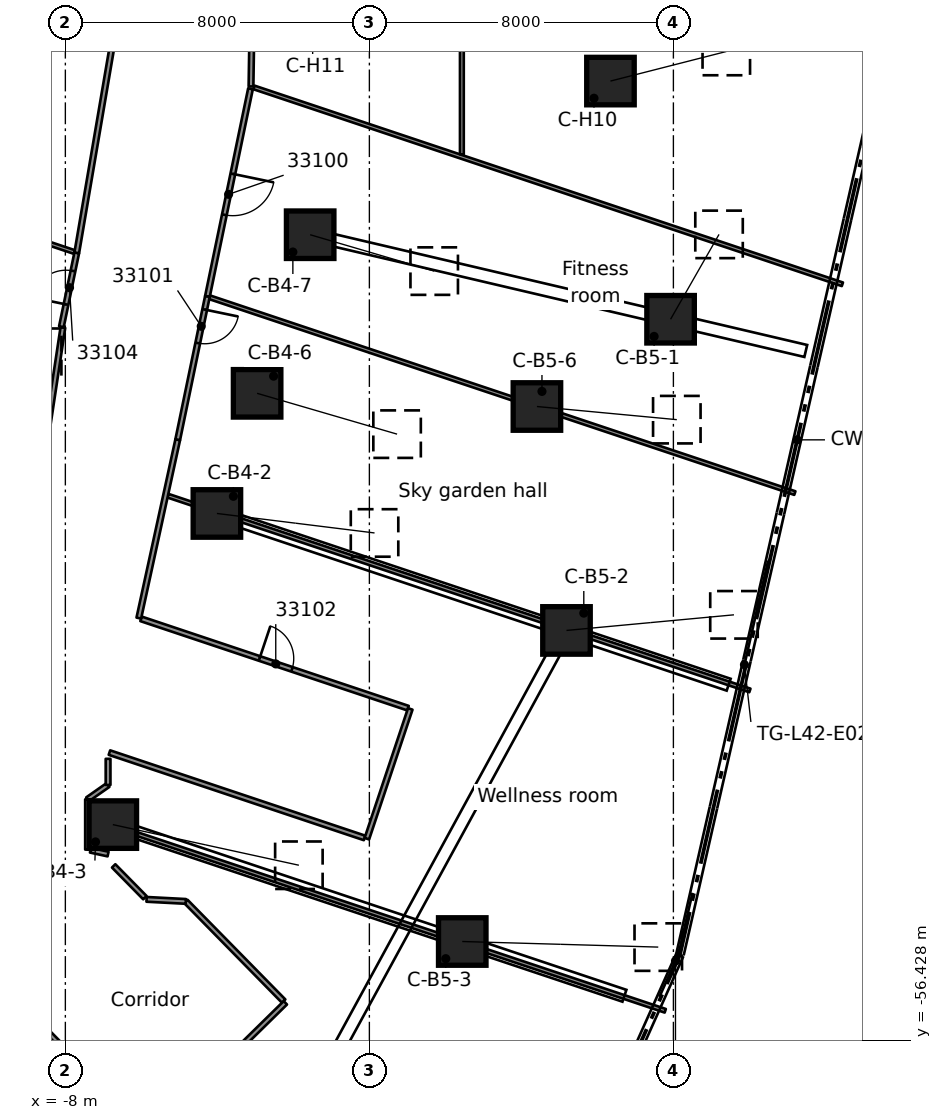
"""IFC4 building model, lengths in metres.
Left out: names, types, materials, properties, quantities, classifications, styles, units other than length and angle.
Written with IfcOpenShell. Run it as: python <this file> out.ifc"""

import sys

from ifc_helpers import new_model, si_unit, direction, frame, frame_2d, origin, origin_2d, place, context, subcontext, project, spatial, rectangle, extrude, element, fill, save


model = new_model("IFC4")
c1 = context("Model", 3, precision=1e-05, world=origin(), true_north=direction((0.0, 1.0)))
c2 = subcontext(c1, "Body", "Model", "MODEL_VIEW")
j1 = project(units=[si_unit("LENGTHUNIT", "METRE"), si_unit("PLANEANGLEUNIT", "RADIAN")], contexts=[c1])
p1 = place(None, origin())
s1 = spatial("IfcSite", under=j1, at=p1, CompositionType="ELEMENT")
p2 = place(p1, origin())
s2 = spatial("IfcBuilding", under=s1, at=p2, CompositionType="ELEMENT")
p3 = place(p2, frame((0.0, 0.0, 163.1)))
s3 = spatial("IfcBuildingStorey", under=s2, at=p3, CompositionType="ELEMENT", Elevation=163.1)
p4 = place(p3, frame((-12.153, -36.321, 0.498), z_axis=(0.688479389186, -0.401551615226, 0.603947374343), x_axis=(0.503813582117, 0.863812406992, 0.0)))
e1 = element("IfcColumn", 1, at=p4, inside=s3, PredefinedType="COLUMN", context=c2, shape_type="SweptSolid", body=[
    extrude(rectangle(XDim=1.25, YDim=1.25, at=origin_2d()), origin(), (0.0, 0.0, 1.0), 4.973),
])
p5 = place(p3, frame((-4.012, -42.56, 0.509), z_axis=(0.80785324827, -0.09989992199, 0.580855519769), x_axis=(0.122726170673, 0.992440571033, 0.0)))
e2 = element("IfcColumn", 2, at=p5, inside=s3, PredefinedType="COLUMN", context=c2, shape_type="SweptSolid", body=[
    extrude(rectangle(XDim=1.25, YDim=1.25, at=origin_2d()), origin(), (0.0, 0.0, 1.0), 5.135),
])
p6 = place(p3, frame((-6.751, -50.747, 0.54), z_axis=(0.844129947707, -0.184282482849, 0.50347253937), x_axis=(0.213287138961, 0.976989557955, 0.0)))
e3 = element("IfcColumn", 3, at=p6, inside=s3, PredefinedType="COLUMN", context=c2, shape_type="SweptSolid", body=[
    extrude(rectangle(XDim=1.25, YDim=1.25, at=origin_2d()), origin(), (0.0, 0.0, 1.0), 5.8),
])
p7 = place(p3, frame((-2.954, -39.399, 0.491), z_axis=(0.754598617916, -0.220037075448, 0.61819463866), x_axis=(0.279936464818, 0.960018528813, 0.0)))
e4 = element("IfcColumn", 4, at=p7, inside=s3, PredefinedType="COLUMN", context=c2, shape_type="SweptSolid", body=[
    extrude(rectangle(XDim=1.25, YDim=1.25, at=origin_2d()), origin(), (0.0, 0.0, 1.0), 4.881),
])
p8 = place(p3, frame((-1.558, -35.226, 0.464), z_axis=(0.712112227691, -0.208786831155, 0.670301599513), x_axis=(0.281350203926, 0.959605159819, 0.0)))
e5 = element("IfcColumn", 5, at=p8, inside=s3, PredefinedType="COLUMN", context=c2, shape_type="SweptSolid", body=[
    extrude(rectangle(XDim=1.25, YDim=1.25, at=origin_2d()), origin(), (0.0, 0.0, 1.0), 4.584),
])
p9 = place(p3, frame((7.926, -37.45, 0.39), z_axis=(0.3093960676, 0.541887482626, 0.781429478281), x_axis=(-0.868418381387, 0.495832143845, 0.0)))
e6 = element("IfcColumn", 6, at=p9, inside=s3, PredefinedType="COLUMN", context=c2, shape_type="SweptSolid", body=[
    extrude(rectangle(XDim=1.25, YDim=1.25, at=origin_2d()), origin(), (0.0, 0.0, 1.0), 4.121),
])
p10 = place(p3, frame((5.187, -45.638, 0.519), z_axis=(0.827554248097, 0.077157708689, 0.556058139448), x_axis=(-0.092833209063, 0.995681673676, 0.0)))
e7 = element("IfcColumn", 7, at=p10, inside=s3, PredefinedType="COLUMN", context=c2, shape_type="SweptSolid", body=[
    extrude(rectangle(XDim=1.25, YDim=1.25, at=origin_2d()), origin(), (0.0, 0.0, 1.0), 5.325),
])
p11 = place(p3, frame((2.444, -53.823, 0.544), z_axis=(0.87058335565, -0.024806701382, 0.491395205951), x_axis=(0.028482783098, 0.99959428323, 0.0)))
e8 = element("IfcColumn", 8, at=p11, inside=s3, PredefinedType="COLUMN", context=c2, shape_type="SweptSolid", body=[
    extrude(rectangle(XDim=1.25, YDim=1.25, at=origin_2d()), origin(), (0.0, 0.0, 1.0), 5.925),
])
p12 = place(p3, frame((4.409, -39.746, 0.483), z_axis=(0.769712005055, -0.072335980313, 0.634279855605), x_axis=(0.093565709776, 0.99561310656, 0.0)))
e9 = element("IfcColumn", 9, at=p12, inside=s3, PredefinedType="COLUMN", context=c2, shape_type="SweptSolid", body=[
    extrude(rectangle(XDim=1.25, YDim=1.25, at=origin_2d()), origin(), (0.0, 0.0, 1.0), 4.782),
])
p13 = place(p3, frame((6.344, -31.183, 0.444), z_axis=(0.68893180134, 0.175861085372, 0.703168437683), x_axis=(-0.247335189642, 0.968929978876, 0.0)))
e10 = element("IfcColumn", 10, at=p13, inside=s3, PredefinedType="COLUMN", context=c2, shape_type="SweptSolid", body=[
    extrude(rectangle(XDim=1.25, YDim=1.25, at=origin_2d()), origin(), (0.0, 0.0, 1.0), 4.424),
])
p14 = place(p3, frame((-10.932, -53.69, 0.0), z_axis=(0.0, 0.0, 1.0), x_axis=(0.700343889426, -0.713805601368, 0.0)))
e11 = element("IfcWall", 11, at=p14, inside=s3, PredefinedType="PARTITIONING", context=c2, shape_type="SweptSolid", body=[
    extrude(rectangle(XDim=7.291, YDim=0.125, at=frame_2d((3.645, 0.0))), origin(), (0.0, 0.0, 1.0), 3.56),
])
p15 = place(p3, frame((-6.729, -51.833, 0.0), z_axis=(0.0, 0.0, 1.0), x_axis=(0.701147009795, -0.713016739394, 0.0)))
e12 = element("IfcWall", 12, at=p15, inside=s3, PredefinedType="PARTITIONING", context=c2, shape_type="SweptSolid", body=[
    extrude(rectangle(XDim=1.172, YDim=0.125, at=frame_2d((0.586, 0.0))), origin(), (0.0, 0.0, 1.0), 3.56),
])
p16 = place(p3, frame((-4.83, -52.768, 0.0), z_axis=(0.0, 0.0, 1.0), x_axis=(0.700567944342, -0.713585702884, 0.0)))
e13 = element("IfcWall", 13, at=p16, inside=s3, PredefinedType="PARTITIONING", context=c2, shape_type="SweptSolid", body=[
    extrude(rectangle(XDim=3.676, YDim=0.125, at=frame_2d((1.838, 0.0))), origin(), (0.0, 0.0, 1.0), 3.56),
])
p17 = place(p3, frame((-7.338, -50.586, 0.0), z_axis=(0.0, 0.0, 1.0), x_axis=(0.948329073506, -0.317288462355, 0.0)))
e14 = element("IfcWall", 14, at=p17, inside=s3, PredefinedType="PARTITIONING", context=c2, shape_type="SweptSolid", body=[
    extrude(rectangle(XDim=15.948, YDim=0.1, at=frame_2d((7.974, 0.0))), origin(), (0.0, 0.0, 1.0), 3.56),
])
p18 = place(p3, frame((-6.84, -48.852, 0.0), z_axis=(0.0, 0.0, 1.0), x_axis=(0.948351729274, -0.317220739522, 0.0)))
e15 = element("IfcWall", 15, at=p18, inside=s3, PredefinedType="PARTITIONING", context=c2, shape_type="SweptSolid", body=[
    extrude(rectangle(XDim=7.08, YDim=0.125, at=frame_2d((3.54, 0.0))), origin(), (0.0, 0.0, 1.0), 3.56),
])
p19 = place(p3, frame((-6.008, -45.333, 0.0), z_axis=(0.0, 0.0, 1.0), x_axis=(0.948343292344, -0.31724596115, 0.0)))
e16 = element("IfcWall", 16, at=p19, inside=s3, PredefinedType="PARTITIONING", context=c2, shape_type="SweptSolid", body=[
    extrude(rectangle(XDim=7.408, YDim=0.125, at=frame_2d((3.704, 0.0))), origin(), (0.0, 0.0, 1.0), 3.56),
])
p20 = place(p19, frame((3.288, 0.0, 0.0)))
e17 = element("IfcOpeningElement", 17, at=p20, cuts=e16, PredefinedType="OPENING", context=c2, shape_type="SweptSolid", body=[
    extrude(rectangle(XDim=0.9, YDim=2.1, at=frame_2d((0.45, 1.05))), frame((0.0, 0.073, 0.0), z_axis=(0.0, -1.0, 0.0), x_axis=(1.0, 0.0, 0.0)), (0.0, 0.0, 1.0), 0.145),
])
p21 = place(p3, frame((-5.301, -42.093, 0.0), z_axis=(0.0, 0.0, 1.0), x_axis=(0.948322863681, -0.317307022015, 0.0)))
e18 = element("IfcWall", 18, at=p21, inside=s3, PredefinedType="PARTITIONING", context=c2, shape_type="SweptSolid", body=[
    extrude(rectangle(XDim=16.148, YDim=0.1, at=frame_2d((8.074, 0.0))), origin(), (0.0, 0.0, 1.0), 3.56),
])
p22 = place(p3, frame((-20.635, -31.373, 0.0), z_axis=(0.0, 0.0, 1.0), x_axis=(0.948310437163, -0.317344158238, 0.0)))
e19 = element("IfcWall", 19, at=p22, inside=s3, PredefinedType="PARTITIONING", context=c2, shape_type="SweptSolid", body=[
    extrude(rectangle(XDim=13.578, YDim=0.1, at=frame_2d((6.789, 0.0))), origin(), (0.0, 0.0, 1.0), 3.56),
])
p23 = place(p3, frame((-4.203, -36.872, 0.0), z_axis=(0.0, 0.0, 1.0), x_axis=(0.9483339029, -0.317274027634, 0.0)))
e20 = element("IfcWall", 20, at=p23, inside=s3, PredefinedType="PARTITIONING", context=c2, shape_type="SweptSolid", body=[
    extrude(rectangle(XDim=16.238, YDim=0.1, at=frame_2d((8.119, 0.0))), origin(), (0.0, 0.0, 1.0), 3.56),
])
p24 = place(p3, frame((-3.038, -31.35, 0.0), z_axis=(0.0, 0.0, 1.0), x_axis=(0.948347845644, -0.317232349647, 0.0)))
e21 = element("IfcWall", 21, at=p24, inside=s3, PredefinedType="PARTITIONING", context=c2, shape_type="SweptSolid", body=[
    extrude(rectangle(XDim=16.329, YDim=0.1, at=frame_2d((8.164, 0.0))), origin(), (0.0, 0.0, 1.0), 3.56),
])
p25 = place(p3, frame((-7.34, -51.421, 0.0), z_axis=(0.0, 0.0, 1.0), x_axis=(0.977097435109, -0.212792392496, 0.0)))
e22 = element("IfcWall", 22, at=p25, inside=s3, PredefinedType="PARTITIONING", context=c2, shape_type="SweptSolid", body=[
    extrude(rectangle(XDim=0.475, YDim=0.125, at=frame_2d((0.238, 0.0))), origin(), (0.0, 0.0, 1.0), 3.56),
])
p26 = place(p3, frame((-7.416, -50.082, 0.0), z_axis=(0.0, 0.0, 1.0), x_axis=(0.819301517876, 0.573362906723, 0.0)))
e23 = element("IfcWall", 23, at=p26, inside=s3, PredefinedType="PARTITIONING", context=c2, shape_type="SweptSolid", body=[
    extrude(rectangle(XDim=0.659, YDim=0.125, at=frame_2d((0.33, 0.0))), origin(), (0.0, 0.0, 1.0), 3.56),
])
p27 = place(p3, frame((-5.78, -58.939, 0.0), z_axis=(0.0, 0.0, 1.0), x_axis=(0.713690867746, 0.70046080925, 0.0)))
e24 = element("IfcWall", 24, at=p27, inside=s3, PredefinedType="PARTITIONING", context=c2, shape_type="SweptSolid", body=[
    extrude(rectangle(XDim=5.001, YDim=0.125, at=frame_2d((2.5, 0.0))), origin(), (0.0, 0.0, 1.0), 3.56),
])
p28 = place(p3, frame((-5.863, -52.714, 0.0), z_axis=(0.0, 0.0, 1.0), x_axis=(0.998638615088, -0.052162404617, 0.0)))
e25 = element("IfcWall", 25, at=p28, inside=s3, PredefinedType="PARTITIONING", context=c2, shape_type="SweptSolid", body=[
    extrude(rectangle(XDim=1.034, YDim=0.125, at=frame_2d((0.517, 0.0))), origin(), (0.0, 0.0, 1.0), 3.56),
])
p29 = place(p3, frame((-0.066, -51.117, 0.0), z_axis=(0.0, 0.0, 1.0), x_axis=(0.317183836314, 0.948364072485, 0.0)))
e26 = element("IfcWall", 26, at=p29, inside=s3, PredefinedType="PARTITIONING", context=c2, shape_type="SweptSolid", body=[
    extrude(rectangle(XDim=3.6, YDim=0.125, at=frame_2d((1.8, 0.0))), origin(), (0.0, 0.0, 1.0), 3.56),
])
p30 = place(p3, frame((-6.067, -45.313, 0.0), z_axis=(0.0, 0.0, 1.0), x_axis=(0.213119450634, 0.977026151012, 0.0)))
e27 = element("IfcWall", 27, at=p30, inside=s3, PredefinedType="PARTITIONING", context=c2, shape_type="SweptSolid", body=[
    extrude(rectangle(XDim=4.804, YDim=0.125, at=frame_2d((2.402, 0.0))), origin(), (0.0, 0.0, 1.0), 3.56),
])
p31 = place(p3, frame((-8.657, -41.582, 0.0), z_axis=(0.0, 0.0, 1.0), x_axis=(0.149631731306, 0.988741798948, 0.0)))
e28 = element("IfcWall", 28, at=p31, inside=s3, PredefinedType="PARTITIONING", context=c2, shape_type="SweptSolid", body=[
    extrude(rectangle(XDim=3.957, YDim=0.125, at=frame_2d((1.978, 0.0))), origin(), (0.0, 0.0, 1.0), 3.56),
])
p32 = place(p3, frame((-3.128, -31.385, 0.0), z_axis=(0.0, 0.0, 1.0), x_axis=(-0.20310730471, -0.979156485335, 0.0)))
e29 = element("IfcWall", 29, at=p32, inside=s3, PredefinedType="PARTITIONING", context=c2, shape_type="SweptSolid", body=[
    extrude(rectangle(XDim=5.583, YDim=0.125, at=frame_2d((2.792, 0.0))), origin(), (0.0, 0.0, 1.0), 3.56),
])
p33 = place(p32, frame((2.288, 0.0, 0.0)))
e30 = element("IfcOpeningElement", 30, at=p33, cuts=e29, PredefinedType="OPENING", context=c2, shape_type="SweptSolid", body=[
    extrude(rectangle(XDim=1.1, YDim=2.1, at=frame_2d((0.55, 1.05))), frame((0.0, 0.073, 0.0), z_axis=(0.0, -1.0, 0.0), x_axis=(1.0, 0.0, 0.0)), (0.0, 0.0, 1.0), 0.145),
])
p34 = place(p3, frame((-4.262, -36.852, 0.0), z_axis=(0.0, 0.0, 1.0), x_axis=(-0.203069477796, -0.979164331043, 0.0)))
e31 = element("IfcWall", 31, at=p34, inside=s3, PredefinedType="PARTITIONING", context=c2, shape_type="SweptSolid", body=[
    extrude(rectangle(XDim=3.846, YDim=0.125, at=frame_2d((1.923, 0.0))), origin(), (0.0, 0.0, 1.0), 3.56),
])
p35 = place(p34, frame((0.35, 0.0, 0.0)))
e32 = element("IfcOpeningElement", 32, at=p35, cuts=e31, PredefinedType="OPENING", context=c2, shape_type="SweptSolid", body=[
    extrude(rectangle(XDim=0.9, YDim=2.1, at=frame_2d((0.45, 1.05))), frame((0.0, 0.073, 0.0), z_axis=(0.0, -1.0, 0.0), x_axis=(1.0, 0.0, 0.0)), (0.0, 0.0, 1.0), 0.145),
])
p36 = place(p3, frame((-3.115, -31.324, 0.0), z_axis=(0.0, 0.0, 1.0), x_axis=(0.015708170038, 0.999876619086, 0.0)))
e33 = element("IfcWall", 33, at=p36, inside=s3, PredefinedType="PARTITIONING", context=c2, shape_type="SweptSolid", body=[
    extrude(rectangle(XDim=4.259, YDim=0.125, at=frame_2d((2.129, 0.0))), origin(), (0.0, 0.0, 1.0), 3.56),
])
p37 = place(p3, frame((-8.104, -37.647, 0.0), z_axis=(0.0, 0.0, 1.0), x_axis=(0.20338984767, 0.979097834675, 0.0)))
e34 = element("IfcWall", 34, at=p37, inside=s3, PredefinedType="PARTITIONING", context=c2, shape_type="SweptSolid", body=[
    extrude(rectangle(XDim=1.987, YDim=0.125, at=frame_2d((0.993, 0.0))), origin(), (0.0, 0.0, 1.0), 3.56),
])
p38 = place(p37, frame((0.6, 0.0, 0.0)))
e35 = element("IfcOpeningElement", 35, at=p38, cuts=e34, PredefinedType="OPENING", context=c2, shape_type="SweptSolid", body=[
    extrude(rectangle(XDim=0.9, YDim=2.1, at=frame_2d((0.45, 1.05))), frame((0.0, 0.073, 0.0), z_axis=(0.0, -1.0, 0.0), x_axis=(1.0, 0.0, 0.0)), (0.0, 0.0, 1.0), 0.145),
])
p39 = place(p3, frame((-7.7, -35.702, 0.0), z_axis=(0.0, 0.0, 1.0), x_axis=(0.168640011859, 0.985677709193, 0.0)))
e36 = element("IfcWall", 36, at=p39, inside=s3, PredefinedType="PARTITIONING", context=c2, shape_type="SweptSolid", body=[
    extrude(rectangle(XDim=5.692, YDim=0.125, at=frame_2d((2.846, 0.0))), origin(), (0.0, 0.0, 1.0), 3.56),
])
p40 = place(p3, frame((2.434, -33.112, 0.0), z_axis=(0.0, 0.0, 1.0), x_axis=(5.4103039e-05, 0.999999998536, 0.0)))
e37 = element("IfcWall", 37, at=p40, inside=s3, PredefinedType="PARTITIONING", context=c2, shape_type="SweptSolid", body=[
    extrude(rectangle(XDim=18.05, YDim=0.1, at=frame_2d((9.025, 0.0))), origin(), (0.0, 0.0, 1.0), 3.56),
])
p41 = place(p3, frame((-6.876, -49.704, 0.0), z_axis=(0.0, 0.0, 1.0), x_axis=(0.0, 1.0, 0.0)))
e38 = element("IfcWall", 38, at=p41, inside=s3, PredefinedType="PARTITIONING", context=c2, shape_type="SweptSolid", body=[
    extrude(rectangle(XDim=0.688, YDim=0.125, at=frame_2d((0.344, 0.0))), origin(), (0.0, 0.0, 1.0), 3.56),
])
p42 = place(p3, frame((-7.416, -51.404, 0.0), z_axis=(0.0, 0.0, 1.0), x_axis=(0.0, 1.0, 0.0)))
e39 = element("IfcWall", 39, at=p42, inside=s3, PredefinedType="PARTITIONING", context=c2, shape_type="SweptSolid", body=[
    extrude(rectangle(XDim=1.322, YDim=0.125, at=frame_2d((0.661, 0.0))), origin(), (0.0, 0.0, 1.0), 3.56),
])
p43 = place(p33, origin())
e40 = element("IfcDoor", 40, at=p43, inside=s3, OperationType="SINGLE_SWING_RIGHT", PredefinedType="DOOR", context=c2, shape_type="SweptSolid", body=[
    extrude(rectangle(XDim=1.1, YDim=2.1, at=frame_2d((0.55, 1.05))), frame((0.0, 0.025, 0.0), z_axis=(0.0, -1.0, 0.0), x_axis=(1.0, 0.0, 0.0)), (0.0, 0.0, 1.0), 0.05),
])
fill(e30, e40)
p44 = place(p35, origin())
e41 = element("IfcDoor", 41, at=p44, inside=s3, OperationType="SINGLE_SWING_LEFT", PredefinedType="DOOR", context=c2, shape_type="SweptSolid", body=[
    extrude(rectangle(XDim=0.9, YDim=2.1, at=frame_2d((0.45, 1.05))), frame((0.0, 0.025, 0.0), z_axis=(0.0, -1.0, 0.0), x_axis=(1.0, 0.0, 0.0)), (0.0, 0.0, 1.0), 0.05),
])
fill(e32, e41)
p45 = place(p20, origin())
e42 = element("IfcDoor", 42, at=p45, inside=s3, OperationType="SINGLE_SWING_RIGHT", PredefinedType="DOOR", context=c2, shape_type="SweptSolid", body=[
    extrude(rectangle(XDim=0.9, YDim=2.1, at=frame_2d((0.45, 1.05))), frame((0.0, 0.025, 0.0), z_axis=(0.0, -1.0, 0.0), x_axis=(1.0, 0.0, 0.0)), (0.0, 0.0, 1.0), 0.05),
])
fill(e17, e42)
p46 = place(p38, origin())
e43 = element("IfcDoor", 43, at=p46, inside=s3, OperationType="SINGLE_SWING_RIGHT", PredefinedType="DOOR", context=c2, shape_type="SweptSolid", body=[
    extrude(rectangle(XDim=0.9, YDim=2.1, at=frame_2d((0.45, 1.05))), frame((0.0, 0.025, 0.0), z_axis=(0.0, -1.0, 0.0), x_axis=(1.0, 0.0, 0.0)), (0.0, 0.0, 1.0), 0.05),
])
fill(e35, e43)
save(model, sys.argv[1])
